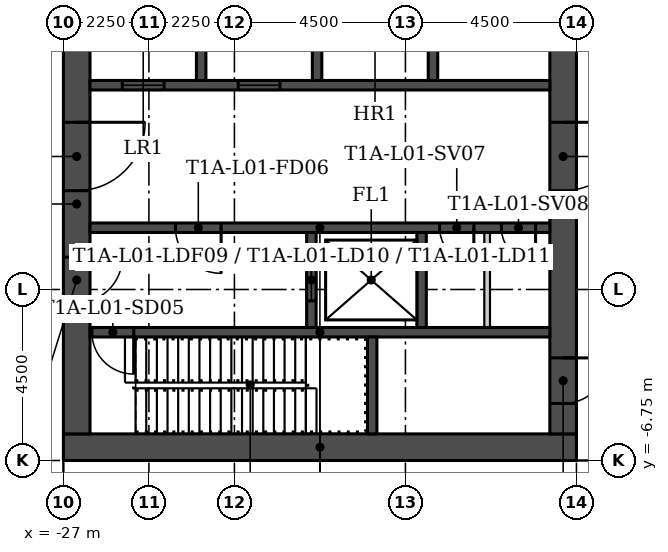
"""IFC4 building model, lengths in metres.
Left out: names, types, materials, properties, quantities, classifications, styles, units other than length and angle.
Written with IfcOpenShell. Run it as: python <this file> out.ifc"""

import sys

from ifc_helpers import new_model, si_unit, direction, frame, frame_2d, origin, place, context, subcontext, project, spatial, rectangle, extrude, element, fill, save


model = new_model("IFC4")
c1 = context("Model", 3, precision=1e-05, world=origin(), true_north=direction((0.0, 1.0)))
c2 = subcontext(c1, "Body", "Model", "MODEL_VIEW")
j1 = project(units=[si_unit("LENGTHUNIT", "METRE"), si_unit("PLANEANGLEUNIT", "RADIAN")], contexts=[c1])
p1 = place(None, origin())
s1 = spatial("IfcSite", under=j1, at=p1, CompositionType="ELEMENT")
p2 = place(p1, origin())
s2 = spatial("IfcBuilding", under=s1, at=p2, CompositionType="ELEMENT")
p3 = place(p2, origin())
s3 = spatial("IfcBuildingStorey", under=s2, at=p3, CompositionType="ELEMENT", Elevation=0.0)
p4 = place(p3, frame((-26.9, -38.155, 0.0), z_axis=(0.0, 0.0, 1.0), x_axis=(0.0, 1.0, 0.0)))
e1 = element("IfcWall", 1, at=p4, inside=s3, PredefinedType="PARTITIONING", context=c2, shape_type="SweptSolid", body=[
    extrude(rectangle(XDim=31.405, YDim=0.2, at=frame_2d((15.703, 0.0))), origin(), (0.0, 0.0, 1.0), 12.1),
])
p5 = place(p3, frame((-13.5, -6.75, 0.0)))
e2 = element("IfcWall", 2, at=p5, inside=s3, PredefinedType="PARTITIONING", context=c2, shape_type="SweptSolid", body=[
    extrude(rectangle(XDim=27.0, YDim=0.25, at=frame_2d((13.5, 0.0))), origin(), (0.0, 0.0, 1.0), 12.1),
])
p6 = place(p5, frame((14.25, 0.0, 0.0)))
e3 = element("IfcOpeningElement", 3, at=p6, cuts=e2, PredefinedType="OPENING", context=c2, shape_type="SweptSolid", body=[
    extrude(rectangle(XDim=1.8, YDim=2.4, at=frame_2d((0.9, 1.2))), frame((0.0, 0.135, 0.0), z_axis=(0.0, -1.0, 0.0), x_axis=(1.0, 0.0, 0.0)), (0.0, 0.0, 1.0), 0.27),
])
p7 = place(p2, frame((0.0, 0.0, 6.5)))
s4 = spatial("IfcBuildingStorey", under=s2, at=p7, CompositionType="ELEMENT", Elevation=6.5)
p8 = place(p7, frame((-27.0, -6.4, 0.0)))
e4 = element("IfcWall", 4, at=p8, inside=s4, PredefinedType="SHEAR", context=c2, shape_type="SweptSolid", body=[
    extrude(rectangle(XDim=13.5, YDim=0.7, at=frame_2d((6.75, 0.0))), origin(), (0.0, 0.0, 1.0), 5.6),
])
p9 = place(p7, frame((-26.65, 6.05, 0.0), z_axis=(0.0, 0.0, 1.0), x_axis=(0.0, -1.0, 0.0)))
e5 = element("IfcWall", 5, at=p9, inside=s4, PredefinedType="SHEAR", context=c2, shape_type="SweptSolid", body=[
    extrude(rectangle(XDim=12.1, YDim=0.7, at=frame_2d((6.05, 0.0))), origin(), (0.0, 0.0, 1.0), 5.6),
])
p10 = place(p9, frame((7.45, 0.0, 0.0)))
e6 = element("IfcOpeningElement", 6, at=p10, cuts=e5, PredefinedType="OPENING", context=c2, shape_type="SweptSolid", body=[
    extrude(rectangle(XDim=1.2, YDim=2.1, at=frame_2d((0.6, 1.05))), frame((0.0, 0.36, 0.0), z_axis=(0.0, -1.0, 0.0), x_axis=(1.0, 0.0, 0.0)), (0.0, 0.0, 1.0), 0.72),
])
p11 = place(p9, frame((3.9, 0.0, 0.0)))
e7 = element("IfcOpeningElement", 7, at=p11, cuts=e5, PredefinedType="OPENING", context=c2, shape_type="SweptSolid", body=[
    extrude(rectangle(XDim=1.8, YDim=2.4, at=frame_2d((0.9, 1.2))), frame((0.0, 0.36, 0.0), z_axis=(0.0, -1.0, 0.0), x_axis=(1.0, 0.0, 0.0)), (0.0, 0.0, 1.0), 0.72),
])
p12 = place(p7, frame((-13.85, 6.05, 0.0), z_axis=(0.0, 0.0, 1.0), x_axis=(0.0, -1.0, 0.0)))
e8 = element("IfcWall", 8, at=p12, inside=s4, PredefinedType="SHEAR", context=c2, shape_type="SweptSolid", body=[
    extrude(rectangle(XDim=12.1, YDim=0.7, at=frame_2d((6.05, 0.0))), origin(), (0.0, 0.0, 1.0), 5.6),
])
p13 = place(p12, frame((10.1, 0.0, 0.0)))
e9 = element("IfcOpeningElement", 9, at=p13, cuts=e8, PredefinedType="OPENING", context=c2, shape_type="SweptSolid", body=[
    extrude(rectangle(XDim=1.2, YDim=2.1, at=frame_2d((0.6, 1.05))), frame((0.0, 0.36, 0.0), z_axis=(0.0, -1.0, 0.0), x_axis=(1.0, 0.0, 0.0)), (0.0, 0.0, 1.0), 0.72),
])
p14 = place(p12, frame((3.9, 0.0, 0.0)))
e10 = element("IfcOpeningElement", 10, at=p14, cuts=e8, PredefinedType="OPENING", context=c2, shape_type="SweptSolid", body=[
    extrude(rectangle(XDim=1.8, YDim=2.4, at=frame_2d((0.9, 1.2))), frame((0.0, 0.36, 0.0), z_axis=(0.0, -1.0, 0.0), x_axis=(1.0, 0.0, 0.0)), (0.0, 0.0, 1.0), 0.72),
])
p15 = place(p7, frame((-14.2, -3.375, 0.0), z_axis=(0.0, 0.0, 1.0), x_axis=(-1.0, 0.0, 0.0)))
e11 = element("IfcWall", 11, at=p15, inside=s4, PredefinedType="SHEAR", context=c2, shape_type="SweptSolid", body=[
    extrude(rectangle(XDim=12.1, YDim=0.25, at=frame_2d((6.05, 0.0))), origin(), (0.0, 0.0, 1.0), 5.6),
])
p16 = place(p15, frame((10.95, 0.0, 0.0)))
e12 = element("IfcOpeningElement", 12, at=p16, cuts=e11, PredefinedType="OPENING", context=c2, shape_type="SweptSolid", body=[
    extrude(rectangle(XDim=1.1, YDim=2.1, at=frame_2d((0.55, 1.05))), frame((0.0, 0.135, 0.0), z_axis=(0.0, -1.0, 0.0), x_axis=(1.0, 0.0, 0.0)), (0.0, 0.0, 1.0), 0.27),
])
p17 = place(p7, frame((-18.875, -6.05, 0.0), z_axis=(0.0, 0.0, 1.0), x_axis=(0.0, 1.0, 0.0)))
e13 = element("IfcWall", 13, at=p17, inside=s4, PredefinedType="SHEAR", context=c2, shape_type="SweptSolid", body=[
    extrude(rectangle(XDim=2.55, YDim=0.25, at=frame_2d((1.275, 0.0))), origin(), (0.0, 0.0, 1.0), 5.6),
])
p18 = place(p7, frame((-14.2, -0.625, 0.0), z_axis=(0.0, 0.0, 1.0), x_axis=(-1.0, 0.0, 0.0)))
e14 = element("IfcWall", 14, at=p18, inside=s4, PredefinedType="SHEAR", context=c2, shape_type="SweptSolid", body=[
    extrude(rectangle(XDim=12.1, YDim=0.25, at=frame_2d((6.05, 0.0))), origin(), (0.0, 0.0, 1.0), 5.6),
])
p19 = place(p18, frame((8.65, 0.0, 0.0)))
e15 = element("IfcOpeningElement", 15, at=p19, cuts=e14, PredefinedType="OPENING", context=c2, shape_type="SweptSolid", body=[
    extrude(rectangle(XDim=1.2, YDim=2.1, at=frame_2d((0.6, 1.05))), frame((0.0, 0.135, 0.0), z_axis=(0.0, -1.0, 0.0), x_axis=(1.0, 0.0, 0.0)), (0.0, 0.0, 1.0), 0.27),
])
p20 = place(p18, frame((2.0, 0.0, 0.0)))
e16 = element("IfcOpeningElement", 16, at=p20, cuts=e14, PredefinedType="OPENING", context=c2, shape_type="SweptSolid", body=[
    extrude(rectangle(XDim=0.9, YDim=2.1, at=frame_2d((0.45, 1.05))), frame((0.0, 0.135, 0.0), z_axis=(0.0, -1.0, 0.0), x_axis=(1.0, 0.0, 0.0)), (0.0, 0.0, 1.0), 0.27),
])
p21 = place(p18, frame((0.375, 0.0, 0.0)))
e17 = element("IfcOpeningElement", 17, at=p21, cuts=e14, PredefinedType="OPENING", context=c2, shape_type="SweptSolid", body=[
    extrude(rectangle(XDim=0.9, YDim=2.1, at=frame_2d((0.45, 1.05))), frame((0.0, 0.135, 0.0), z_axis=(0.0, -1.0, 0.0), x_axis=(1.0, 0.0, 0.0)), (0.0, 0.0, 1.0), 0.27),
])
p22 = place(p7, frame((-20.475, -3.25, 0.0), z_axis=(0.0, 0.0, 1.0), x_axis=(0.0, 1.0, 0.0)))
e18 = element("IfcWall", 18, at=p22, inside=s4, PredefinedType="SHEAR", context=c2, shape_type="SweptSolid", body=[
    extrude(rectangle(XDim=2.5, YDim=0.25, at=frame_2d((1.25, 0.0))), origin(), (0.0, 0.0, 1.0), 5.6),
])
p23 = place(p22, frame((0.7, 0.0, 0.0)))
e19 = element("IfcOpeningElement", 19, at=p23, cuts=e18, PredefinedType="OPENING", context=c2, shape_type="SweptSolid", body=[
    extrude(rectangle(XDim=1.1, YDim=2.1, at=frame_2d((0.55, 1.05))), frame((0.0, 0.135, 0.0), z_axis=(0.0, -1.0, 0.0), x_axis=(1.0, 0.0, 0.0)), (0.0, 0.0, 1.0), 0.27),
])
p24 = place(p7, frame((-17.575, -3.25, 0.0), z_axis=(0.0, 0.0, 1.0), x_axis=(0.0, 1.0, 0.0)))
e20 = element("IfcWall", 20, at=p24, inside=s4, PredefinedType="SHEAR", context=c2, shape_type="SweptSolid", body=[
    extrude(rectangle(XDim=2.5, YDim=0.25, at=frame_2d((1.25, 0.0))), origin(), (0.0, 0.0, 1.0), 5.6),
])
p25 = place(p7, frame((-15.85, -3.25, 0.0), z_axis=(0.0, 0.0, 1.0), x_axis=(0.0, 1.0, 0.0)))
e21 = element("IfcWall", 21, at=p25, inside=s4, PredefinedType="PARTITIONING", context=c2, shape_type="SweptSolid", body=[
    extrude(rectangle(XDim=2.5, YDim=0.15, at=frame_2d((1.25, 0.0))), origin(), (0.0, 0.0, 1.0), 5.6),
])
p26 = place(p7, frame((-26.3, 3.125, 0.0)))
e22 = element("IfcWall", 22, at=p26, inside=s4, PredefinedType="SHEAR", context=c2, shape_type="SweptSolid", body=[
    extrude(rectangle(XDim=12.1, YDim=0.25, at=frame_2d((6.05, 0.0))), origin(), (0.0, 0.0, 1.0), 5.6),
])
p27 = place(p26, frame((0.85, 0.0, 0.0)))
e23 = element("IfcOpeningElement", 23, at=p27, cuts=e22, PredefinedType="OPENING", context=c2, shape_type="SweptSolid", body=[
    extrude(rectangle(XDim=1.1, YDim=2.1, at=frame_2d((0.55, 1.05))), frame((0.0, 0.135, 0.0), z_axis=(0.0, -1.0, 0.0), x_axis=(1.0, 0.0, 0.0)), (0.0, 0.0, 1.0), 0.27),
])
p28 = place(p26, frame((3.9, 0.0, 0.0)))
e24 = element("IfcOpeningElement", 24, at=p28, cuts=e22, PredefinedType="OPENING", context=c2, shape_type="SweptSolid", body=[
    extrude(rectangle(XDim=1.1, YDim=2.1, at=frame_2d((0.55, 1.05))), frame((0.0, 0.135, 0.0), z_axis=(0.0, -1.0, 0.0), x_axis=(1.0, 0.0, 0.0)), (0.0, 0.0, 1.0), 0.27),
])
for number, where, z_axis, x_axis in (
    (25, (-23.375, 3.25, 0.0), (0.0, 0.0, 1.0), (0.0, 1.0, 0.0)),
    (26, (-20.325, 3.25, 0.0), (0.0, 0.0, 1.0), (0.0, 1.0, 0.0)),
    (27, (-17.275, 3.25, 0.0), (0.0, 0.0, 1.0), (0.0, 1.0, 0.0)),
):
    element("IfcWall", number, at=place(p7, frame(where, z_axis=z_axis, x_axis=x_axis)), inside=s4, PredefinedType="SHEAR", context=c2, shape_type="SweptSolid", body=[
        extrude(rectangle(XDim=2.8, YDim=0.25, at=frame_2d((1.4, 0.0))), origin(), (0.0, 0.0, 1.0), 5.6),
    ])
p29 = place(p10, origin())
e28 = element("IfcDoor", 28, at=p29, inside=s4, OperationType="SINGLE_SWING_RIGHT", PredefinedType="DOOR", context=c2, shape_type="SweptSolid", body=[
    extrude(rectangle(XDim=1.2, YDim=2.1, at=frame_2d((0.6, 1.05))), frame((0.0, 0.025, 0.0), z_axis=(0.0, -1.0, 0.0), x_axis=(1.0, 0.0, 0.0)), (0.0, 0.0, 1.0), 0.05),
])
fill(e6, e28)
p30 = place(p11, origin())
e29 = element("IfcDoor", 29, at=p30, inside=s4, OperationType="DOUBLE_DOOR_SINGLE_SWING", PredefinedType="DOOR", context=c2, shape_type="SweptSolid", body=[
    extrude(rectangle(XDim=1.8, YDim=2.4, at=frame_2d((0.9, 1.2))), frame((0.0, 0.025, 0.0), z_axis=(0.0, -1.0, 0.0), x_axis=(1.0, 0.0, 0.0)), (0.0, 0.0, 1.0), 0.05),
])
fill(e7, e29)
p31 = place(p13, origin())
e30 = element("IfcDoor", 30, at=p31, inside=s4, OperationType="SINGLE_SWING_RIGHT", PredefinedType="DOOR", context=c2, shape_type="SweptSolid", body=[
    extrude(rectangle(XDim=1.2, YDim=2.1, at=frame_2d((0.6, 1.05))), frame((0.0, 0.025, 0.0), z_axis=(0.0, -1.0, 0.0), x_axis=(1.0, 0.0, 0.0)), (0.0, 0.0, 1.0), 0.05),
])
fill(e9, e30)
p32 = place(p14, origin())
e31 = element("IfcDoor", 31, at=p32, inside=s4, OperationType="DOUBLE_DOOR_SINGLE_SWING", PredefinedType="DOOR", context=c2, shape_type="SweptSolid", body=[
    extrude(rectangle(XDim=1.8, YDim=2.4, at=frame_2d((0.9, 1.2))), frame((0.0, 0.025, 0.0), z_axis=(0.0, -1.0, 0.0), x_axis=(1.0, 0.0, 0.0)), (0.0, 0.0, 1.0), 0.05),
])
fill(e10, e31)
p33 = place(p16, origin())
e32 = element("IfcDoor", 32, at=p33, inside=s4, OperationType="SINGLE_SWING_RIGHT", PredefinedType="DOOR", context=c2, shape_type="SweptSolid", body=[
    extrude(rectangle(XDim=1.1, YDim=2.1, at=frame_2d((0.55, 1.05))), frame((0.0, 0.025, 0.0), z_axis=(0.0, -1.0, 0.0), x_axis=(1.0, 0.0, 0.0)), (0.0, 0.0, 1.0), 0.05),
])
fill(e12, e32)
p34 = place(p19, origin())
e33 = element("IfcDoor", 33, at=p34, inside=s4, OperationType="SINGLE_SWING_RIGHT", PredefinedType="DOOR", context=c2, shape_type="SweptSolid", body=[
    extrude(rectangle(XDim=1.2, YDim=2.1, at=frame_2d((0.6, 1.05))), frame((0.0, 0.025, 0.0), z_axis=(0.0, -1.0, 0.0), x_axis=(1.0, 0.0, 0.0)), (0.0, 0.0, 1.0), 0.05),
])
fill(e15, e33)
p35 = place(p20, origin())
e34 = element("IfcDoor", 34, at=p35, inside=s4, OperationType="SINGLE_SWING_LEFT", PredefinedType="DOOR", context=c2, shape_type="SweptSolid", body=[
    extrude(rectangle(XDim=0.9, YDim=2.1, at=frame_2d((0.45, 1.05))), frame((0.0, 0.025, 0.0), z_axis=(0.0, -1.0, 0.0), x_axis=(1.0, 0.0, 0.0)), (0.0, 0.0, 1.0), 0.05),
])
fill(e16, e34)
p36 = place(p21, origin())
e35 = element("IfcDoor", 35, at=p36, inside=s4, OperationType="SINGLE_SWING_LEFT", PredefinedType="DOOR", context=c2, shape_type="SweptSolid", body=[
    extrude(rectangle(XDim=0.9, YDim=2.1, at=frame_2d((0.45, 1.05))), frame((0.0, 0.025, 0.0), z_axis=(0.0, -1.0, 0.0), x_axis=(1.0, 0.0, 0.0)), (0.0, 0.0, 1.0), 0.05),
])
fill(e17, e35)
p37 = place(p23, origin())
e36 = element("IfcDoor", 36, at=p37, inside=s4, OperationType="SLIDING_TO_LEFT", PredefinedType="DOOR", context=c2, shape_type="SweptSolid", body=[
    extrude(rectangle(XDim=1.1, YDim=2.1, at=frame_2d((0.55, 1.05))), frame((0.0, 0.025, 0.0), z_axis=(0.0, -1.0, 0.0), x_axis=(1.0, 0.0, 0.0)), (0.0, 0.0, 1.0), 0.05),
])
fill(e19, e36)
p38 = place(p27, origin())
e37 = element("IfcDoor", 37, at=p38, inside=s4, OperationType="SLIDING_TO_LEFT", PredefinedType="DOOR", context=c2, shape_type="SweptSolid", body=[
    extrude(rectangle(XDim=1.1, YDim=2.1, at=frame_2d((0.55, 1.05))), frame((0.0, 0.025, 0.0), z_axis=(0.0, -1.0, 0.0), x_axis=(1.0, 0.0, 0.0)), (0.0, 0.0, 1.0), 0.05),
])
fill(e23, e37)
p39 = place(p28, origin())
e38 = element("IfcDoor", 38, at=p39, inside=s4, OperationType="SLIDING_TO_LEFT", PredefinedType="DOOR", context=c2, shape_type="SweptSolid", body=[
    extrude(rectangle(XDim=1.1, YDim=2.1, at=frame_2d((0.55, 1.05))), frame((0.0, 0.025, 0.0), z_axis=(0.0, -1.0, 0.0), x_axis=(1.0, 0.0, 0.0)), (0.0, 0.0, 1.0), 0.05),
])
fill(e24, e38)
save(model, sys.argv[1])
